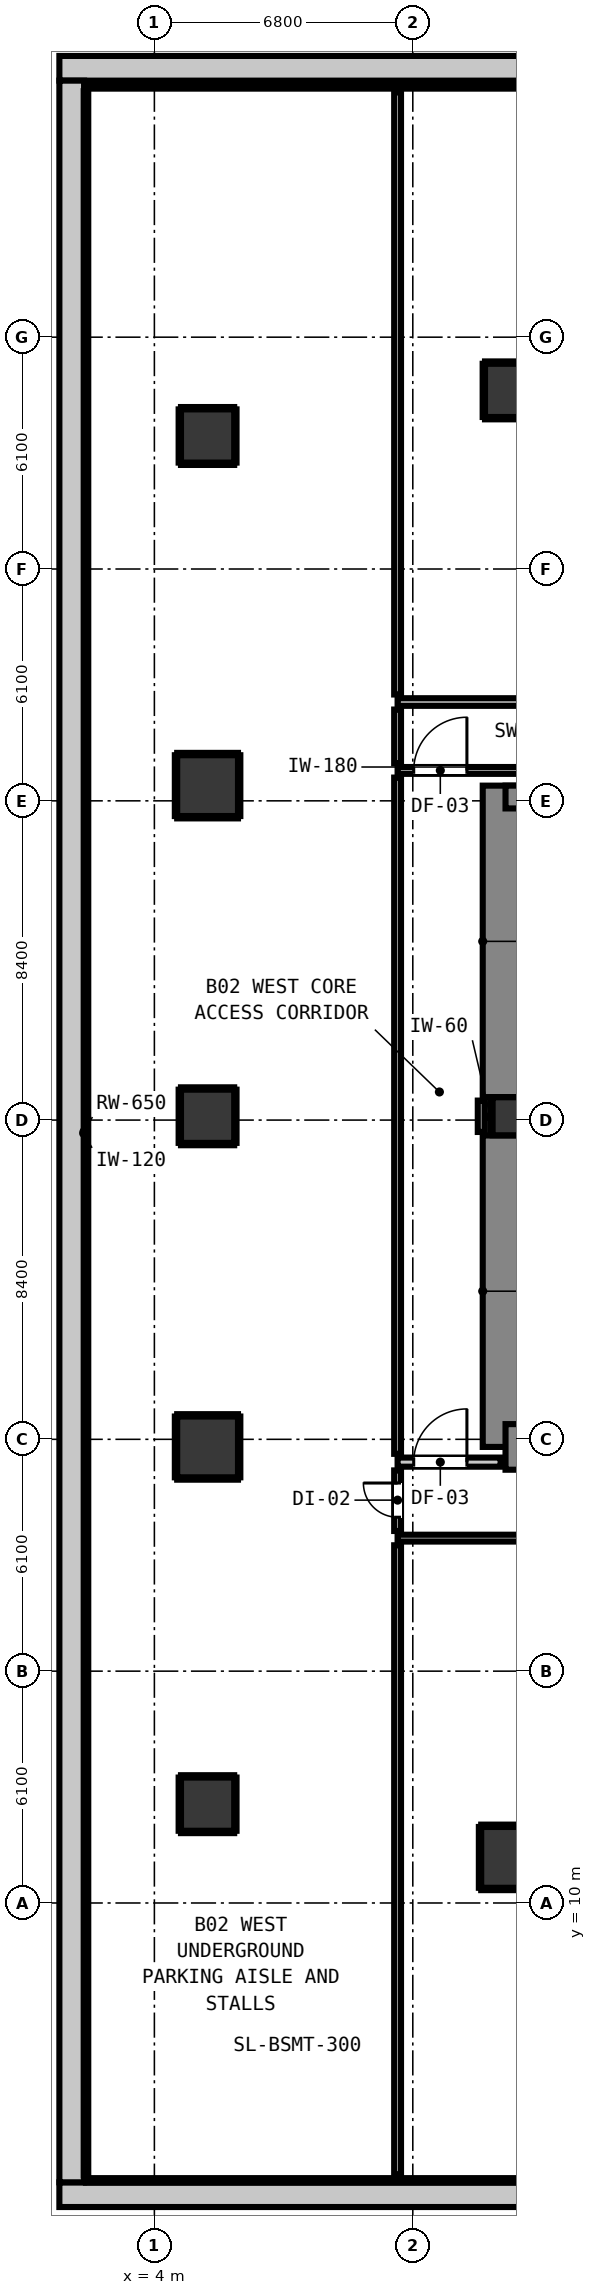
"""IFC4 building model, lengths in metres.
Left out: names, types, materials, properties, quantities, classifications, styles, units other than length and angle.
Written with IfcOpenShell. Run it as: python <this file> out.ifc"""

import sys

from ifc_helpers import new_model, si_unit, direction, frame, frame_2d, origin, origin_2d, place, context, subcontext, project, spatial, rectangle, extrude, element, fill, save


model = new_model("IFC4")
c1 = context("Model", 3, precision=1e-05, world=origin(), true_north=direction((0.0, 1.0)))
c2 = subcontext(c1, "Body", "Model", "MODEL_VIEW")
j1 = project(units=[si_unit("LENGTHUNIT", "METRE"), si_unit("PLANEANGLEUNIT", "RADIAN")], contexts=[c1])
p1 = place(None, origin())
s1 = spatial("IfcSite", under=j1, at=p1, CompositionType="ELEMENT")
p2 = place(p1, origin())
s2 = spatial("IfcBuilding", under=s1, at=p2, CompositionType="ELEMENT")
p3 = place(p2, frame((0.0, 0.0, -8.8)))
s3 = spatial("IfcBuildingStorey", under=s2, at=p3, CompositionType="ELEMENT", Elevation=-8.8)
for number, where, z_axis, x_axis in (
    (1, (1.5, 2.325, 0.0), (0.0, 0.0, 1.0), (1.0, 0.0, 0.0)),
    (2, (85.0, 58.275, 0.0), (0.0, 0.0, 1.0), (-1.0, 0.0, 0.0)),
):
    element("IfcWall", number, at=place(p3, frame(where, z_axis=z_axis, x_axis=x_axis)), inside=s3, PredefinedType="SOLIDWALL", context=c2, shape_type="SweptSolid", body=[
        extrude(rectangle(XDim=83.5, YDim=0.65, at=frame_2d((41.75, 0.0))), origin(), (0.0, 0.0, 1.0), 4.4),
    ])
p4 = place(p3, frame((1.825, 57.95, 0.0), z_axis=(0.0, 0.0, 1.0), x_axis=(0.0, -1.0, 0.0)))
e3 = element("IfcWall", 3, at=p4, inside=s3, PredefinedType="SOLIDWALL", context=c2, shape_type="SweptSolid", body=[
    extrude(rectangle(XDim=55.3, YDim=0.65, at=frame_2d((27.65, 0.0))), origin(), (0.0, 0.0, 1.0), 4.4),
])
p5 = place(p3, frame((13.4, 30.7, 0.0), z_axis=(0.0, 0.0, 1.0), x_axis=(1.0, 0.0, 0.0)))
e4 = element("IfcColumn", 4, at=p5, inside=s3, PredefinedType="COLUMN", context=c2, shape_type="SweptSolid", body=[
    extrude(rectangle(XDim=1.0, YDim=1.0, at=origin_2d()), origin(), (0.0, 0.0, 1.0), 4.4),
])
p6 = place(p3, frame((13.24, 22.0, 0.0), z_axis=(0.0, 0.0, 1.0), x_axis=(0.0, 1.0, 0.0)))
e5 = element("IfcWall", 5, at=p6, inside=s3, PredefinedType="SHEAR", context=c2, shape_type="SweptSolid", body=[
    extrude(rectangle(XDim=8.195, YDim=1.2, at=frame_2d((4.098, 0.0))), origin(), (0.0, 0.0, 1.0), 4.4),
])
p7 = place(p3, frame((13.24, 31.205, 0.0), z_axis=(0.0, 0.0, 1.0), x_axis=(0.0, 1.0, 0.0)))
e6 = element("IfcWall", 6, at=p7, inside=s3, PredefinedType="SHEAR", context=c2, shape_type="SweptSolid", body=[
    extrude(rectangle(XDim=8.195, YDim=1.2, at=frame_2d((4.097, 0.0))), origin(), (0.0, 0.0, 1.0), 4.4),
])
p8 = place(p3, frame((13.24, 22.0, 0.0), z_axis=(0.0, 0.0, 1.0), x_axis=(1.0, 0.0, 0.0)))
e7 = element("IfcWall", 7, at=p8, inside=s3, PredefinedType="SHEAR", context=c2, shape_type="SweptSolid", body=[
    extrude(rectangle(XDim=4.08, YDim=1.2, at=frame_2d((2.04, 0.0))), origin(), (0.0, 0.0, 1.0), 4.4),
])
p9 = place(p3, frame((13.24, 39.1, 0.0), z_axis=(0.0, 0.0, 1.0), x_axis=(1.0, 0.0, 0.0)))
e8 = element("IfcWall", 8, at=p9, inside=s3, PredefinedType="SHEAR", context=c2, shape_type="SweptSolid", body=[
    extrude(rectangle(XDim=4.08, YDim=0.6, at=frame_2d((2.04, 0.0))), origin(), (0.0, 0.0, 1.0), 4.4),
])
p10 = place(p3, frame((13.4, 11.2, 0.0), z_axis=(0.0, 0.0, 1.0), x_axis=(1.0, 0.0, 0.0)))
e9 = element("IfcColumn", 9, at=p10, inside=s3, PredefinedType="COLUMN", context=c2, shape_type="SweptSolid", body=[
    extrude(rectangle(XDim=1.6, YDim=1.6, at=origin_2d()), origin(), (0.0, 0.0, 1.0), 4.4),
])
p11 = place(p3, frame((13.4, 49.8, 0.0), z_axis=(0.0, 0.0, 1.0), x_axis=(1.0, 0.0, 0.0)))
e10 = element("IfcColumn", 10, at=p11, inside=s3, PredefinedType="COLUMN", context=c2, shape_type="SweptSolid", body=[
    extrude(rectangle(XDim=1.4, YDim=1.4, at=origin_2d()), origin(), (0.0, 0.0, 1.0), 4.4),
])
p12 = place(p3, frame((5.4, 22.0, 0.0), z_axis=(0.0, 0.0, 1.0), x_axis=(1.0, 0.0, 0.0)))
e11 = element("IfcColumn", 11, at=p12, inside=s3, PredefinedType="COLUMN", context=c2, shape_type="SweptSolid", body=[
    extrude(rectangle(XDim=1.6, YDim=1.6, at=origin_2d()), origin(), (0.0, 0.0, 1.0), 4.4),
])
p13 = place(p3, frame((5.4, 30.7, 0.0), z_axis=(0.0, 0.0, 1.0), x_axis=(1.0, 0.0, 0.0)))
e12 = element("IfcColumn", 12, at=p13, inside=s3, PredefinedType="COLUMN", context=c2, shape_type="SweptSolid", body=[
    extrude(rectangle(XDim=1.4, YDim=1.4, at=origin_2d()), origin(), (0.0, 0.0, 1.0), 4.4),
])
p14 = place(p3, frame((5.4, 39.4, 0.0), z_axis=(0.0, 0.0, 1.0), x_axis=(1.0, 0.0, 0.0)))
e13 = element("IfcColumn", 13, at=p14, inside=s3, PredefinedType="COLUMN", context=c2, shape_type="SweptSolid", body=[
    extrude(rectangle(XDim=1.6, YDim=1.6, at=origin_2d()), origin(), (0.0, 0.0, 1.0), 4.4),
])
for number, where, z_axis, x_axis in (
    (14, (5.4, 12.6, 0.0), (0.0, 0.0, 1.0), (1.0, 0.0, 0.0)),
    (15, (5.4, 48.6, 0.0), (0.0, 0.0, 1.0), (1.0, 0.0, 0.0)),
):
    element("IfcColumn", number, at=place(p3, frame(where, z_axis=z_axis, x_axis=x_axis)), inside=s3, PredefinedType="COLUMN", context=c2, shape_type="SweptSolid", body=[
        extrude(rectangle(XDim=1.4, YDim=1.4, at=origin_2d()), origin(), (0.0, 0.0, 1.0), 4.4),
    ])
p15 = place(p3, frame((10.4, 21.6, 0.0), z_axis=(0.0, 0.0, 1.0), x_axis=(1.0, 0.0, 0.0)))
e16 = element("IfcWall", 16, at=p15, inside=s3, PredefinedType="PARTITIONING", context=c2, shape_type="SweptSolid", body=[
    extrude(rectangle(XDim=2.71, YDim=0.24, at=frame_2d((1.355, 0.0))), origin(), (0.0, 0.0, 1.0), 3.335),
])
p16 = place(p15, frame((0.424, 0.0, 0.0)))
e17 = element("IfcOpeningElement", 17, at=p16, cuts=e16, PredefinedType="OPENING", context=c2, shape_type="SweptSolid", body=[
    extrude(rectangle(XDim=1.4, YDim=2.15, at=frame_2d((0.7, 1.075))), frame((0.0, 0.13, 0.0), z_axis=(0.0, -1.0, 0.0), x_axis=(1.0, 0.0, 0.0)), (0.0, 0.0, 1.0), 0.26),
])
p17 = place(p3, frame((10.4, 41.6, 0.0), z_axis=(0.0, 0.0, 1.0), x_axis=(1.0, 0.0, 0.0)))
e18 = element("IfcWall", 18, at=p17, inside=s3, PredefinedType="PARTITIONING", context=c2, shape_type="SweptSolid", body=[
    extrude(rectangle(XDim=44.788, YDim=0.2, at=frame_2d((22.394, 0.0))), origin(), (0.0, 0.0, 1.0), 4.1),
])
p18 = place(p17, frame((16.374, 0.0, 0.0)))
e19 = element("IfcOpeningElement", 19, at=p18, cuts=e18, PredefinedType="OPENING", context=c2, shape_type="SweptSolid", body=[
    extrude(rectangle(XDim=0.9, YDim=2.1, at=frame_2d((0.45, 1.05))), frame((0.0, 0.11, 0.0), z_axis=(0.0, -1.0, 0.0), x_axis=(1.0, 0.0, 0.0)), (0.0, 0.0, 1.0), 0.22),
])
p19 = place(p17, frame((35.37, 0.0, 0.0)))
e20 = element("IfcOpeningElement", 20, at=p19, cuts=e18, PredefinedType="OPENING", context=c2, shape_type="SweptSolid", body=[
    extrude(rectangle(XDim=0.86, YDim=2.02, at=frame_2d((0.43, 1.01))), frame((0.0, 0.11, 0.0), z_axis=(0.0, -1.0, 0.0), x_axis=(1.0, 0.0, 0.0)), (0.0, 0.0, 1.0), 0.22),
])
p20 = place(p17, frame((39.725, 0.0, 0.0)))
e21 = element("IfcOpeningElement", 21, at=p20, cuts=e18, PredefinedType="OPENING", context=c2, shape_type="SweptSolid", body=[
    extrude(rectangle(XDim=0.95, YDim=2.1, at=frame_2d((0.475, 1.05))), frame((0.0, 0.11, 0.0), z_axis=(0.0, -1.0, 0.0), x_axis=(1.0, 0.0, 0.0)), (0.0, 0.0, 1.0), 0.22),
])
p21 = place(p3, frame((10.4, 19.6, 0.0), z_axis=(0.0, 0.0, 1.0), x_axis=(1.0, 0.0, 0.0)))
e22 = element("IfcWall", 22, at=p21, inside=s3, PredefinedType="PARTITIONING", context=c2, shape_type="SweptSolid", body=[
    extrude(rectangle(XDim=36.902, YDim=0.18, at=frame_2d((18.451, 0.0))), origin(), (0.0, 0.0, 1.0), 4.1),
])
p22 = place(p21, frame((13.274, 0.0, 0.0)))
e23 = element("IfcOpeningElement", 23, at=p22, cuts=e22, PredefinedType="OPENING", context=c2, shape_type="SweptSolid", body=[
    extrude(rectangle(XDim=0.9, YDim=2.1, at=frame_2d((0.45, 1.05))), frame((0.0, 0.1, 0.0), z_axis=(0.0, -1.0, 0.0), x_axis=(1.0, 0.0, 0.0)), (0.0, 0.0, 1.0), 0.2),
])
p23 = place(p21, frame((32.576, 0.0, 0.0)))
e24 = element("IfcOpeningElement", 24, at=p23, cuts=e22, PredefinedType="OPENING", context=c2, shape_type="SweptSolid", body=[
    extrude(rectangle(XDim=0.9, YDim=2.1, at=frame_2d((0.45, 1.05))), frame((0.0, 0.1, 0.0), z_axis=(0.0, -1.0, 0.0), x_axis=(1.0, 0.0, 0.0)), (0.0, 0.0, 1.0), 0.2),
])
p24 = place(p3, frame((10.4, 39.8, 0.0), z_axis=(0.0, 0.0, 1.0), x_axis=(1.0, 0.0, 0.0)))
e25 = element("IfcWall", 25, at=p24, inside=s3, PredefinedType="PARTITIONING", context=c2, shape_type="SweptSolid", body=[
    extrude(rectangle(XDim=9.798, YDim=0.18, at=frame_2d((4.899, 0.0))), origin(), (0.0, 0.0, 1.0), 3.335),
])
p25 = place(p24, frame((7.035, 0.0, 0.0)))
e26 = element("IfcOpeningElement", 26, at=p25, cuts=e25, PredefinedType="OPENING", context=c2, shape_type="SweptSolid", body=[
    extrude(rectangle(XDim=1.4, YDim=2.15, at=frame_2d((0.7, 1.075))), frame((0.0, 0.1, 0.0), z_axis=(0.0, -1.0, 0.0), x_axis=(1.0, 0.0, 0.0)), (0.0, 0.0, 1.0), 0.2),
])
p26 = place(p24, frame((0.424, 0.0, 0.0)))
e27 = element("IfcOpeningElement", 27, at=p26, cuts=e25, PredefinedType="OPENING", context=c2, shape_type="SweptSolid", body=[
    extrude(rectangle(XDim=1.4, YDim=2.15, at=frame_2d((0.7, 1.075))), frame((0.0, 0.1, 0.0), z_axis=(0.0, -1.0, 0.0), x_axis=(1.0, 0.0, 0.0)), (0.0, 0.0, 1.0), 0.2),
])
p27 = place(p3, frame((2.2, 2.7, 0.0), z_axis=(0.0, 0.0, 1.0), x_axis=(1.0, 0.0, 0.0)))
e28 = element("IfcWall", 28, at=p27, inside=s3, PredefinedType="PARTITIONING", context=c2, shape_type="SweptSolid", body=[
    extrude(rectangle(XDim=35.6, YDim=0.12, at=frame_2d((17.8, 0.0))), origin(), (0.0, 0.0, 1.0), 4.1),
])
p28 = place(p3, frame((2.2, 57.8, 0.0), z_axis=(0.0, 0.0, 1.0), x_axis=(1.0, 0.0, 0.0)))
e29 = element("IfcWall", 29, at=p28, inside=s3, PredefinedType="PARTITIONING", context=c2, shape_type="SweptSolid", body=[
    extrude(rectangle(XDim=41.8, YDim=0.12, at=frame_2d((20.9, 0.0))), origin(), (0.0, 0.0, 1.0), 4.1),
])
p29 = place(p3, frame((10.4, 2.858, 0.0), z_axis=(0.0, 0.0, 1.0), x_axis=(0.0, 1.0, 0.0)))
e30 = element("IfcWall", 30, at=p29, inside=s3, PredefinedType="PARTITIONING", context=c2, shape_type="SweptSolid", body=[
    extrude(rectangle(XDim=16.554, YDim=0.18, at=frame_2d((8.277, 0.0))), origin(), (0.0, 0.0, 1.0), 4.1),
])
p30 = place(p3, frame((10.4, 19.788, 0.0), z_axis=(0.0, 0.0, 1.0), x_axis=(0.0, 1.0, 0.0)))
e31 = element("IfcWall", 31, at=p30, inside=s3, PredefinedType="PARTITIONING", context=c2, shape_type="SweptSolid", body=[
    extrude(rectangle(XDim=1.594, YDim=0.18, at=frame_2d((0.797, 0.0))), origin(), (0.0, 0.0, 1.0), 4.1),
])
p31 = place(p30, frame((0.362, 0.0, 0.0)))
e32 = element("IfcOpeningElement", 32, at=p31, cuts=e31, PredefinedType="OPENING", context=c2, shape_type="SweptSolid", body=[
    extrude(rectangle(XDim=0.9, YDim=2.1, at=frame_2d((0.45, 1.05))), frame((0.0, 0.1, 0.0), z_axis=(0.0, -1.0, 0.0), x_axis=(1.0, 0.0, 0.0)), (0.0, 0.0, 1.0), 0.2),
])
p32 = place(p3, frame((10.4, 21.818, 0.0), z_axis=(0.0, 0.0, 1.0), x_axis=(0.0, 1.0, 0.0)))
e33 = element("IfcWall", 33, at=p32, inside=s3, PredefinedType="PARTITIONING", context=c2, shape_type="SweptSolid", body=[
    extrude(rectangle(XDim=17.794, YDim=0.18, at=frame_2d((8.897, 0.0))), origin(), (0.0, 0.0, 1.0), 4.1),
])
p33 = place(p3, frame((10.4, 39.988, 0.0), z_axis=(0.0, 0.0, 1.0), x_axis=(0.0, 1.0, 0.0)))
e34 = element("IfcWall", 34, at=p33, inside=s3, PredefinedType="PARTITIONING", context=c2, shape_type="SweptSolid", body=[
    extrude(rectangle(XDim=1.414, YDim=0.18, at=frame_2d((0.707, 0.0))), origin(), (0.0, 0.0, 1.0), 4.1),
])
p34 = place(p3, frame((10.4, 41.798, 0.0), z_axis=(0.0, 0.0, 1.0), x_axis=(0.0, 1.0, 0.0)))
e35 = element("IfcWall", 35, at=p34, inside=s3, PredefinedType="PARTITIONING", context=c2, shape_type="SweptSolid", body=[
    extrude(rectangle(XDim=15.844, YDim=0.18, at=frame_2d((7.922, 0.0))), origin(), (0.0, 0.0, 1.0), 4.1),
])
p35 = place(p3, frame((12.6, 30.287, 0.0), z_axis=(0.0, 0.0, 1.0), x_axis=(0.0, 1.0, 0.0)))
e36 = element("IfcWall", 36, at=p35, inside=s3, PredefinedType="PARTITIONING", context=c2, shape_type="SweptSolid", body=[
    extrude(rectangle(XDim=0.826, YDim=0.18, at=frame_2d((0.413, 0.0))), origin(), (0.0, 0.0, 1.0), 4.1),
])
p36 = place(p3, frame((2.2, 2.828, 0.0), z_axis=(0.0, 0.0, 1.0), x_axis=(0.0, 1.0, 0.0)))
e37 = element("IfcWall", 37, at=p36, inside=s3, PredefinedType="PARTITIONING", context=c2, shape_type="SweptSolid", body=[
    extrude(rectangle(XDim=54.844, YDim=0.12, at=frame_2d((27.422, 0.0))), origin(), (0.0, 0.0, 1.0), 4.1),
])
p37 = place(p3, frame((12.868, 30.21, 0.0), z_axis=(0.0, 0.0, 1.0), x_axis=(0.0, 1.0, 0.0)))
e38 = element("IfcWall", 38, at=p37, inside=s3, PredefinedType="PARTITIONING", context=c2, shape_type="SweptSolid", body=[
    extrude(rectangle(XDim=0.98, YDim=0.06, at=frame_2d((0.49, 0.0))), origin(), (0.0, 0.0, 1.0), 1.45),
])
for number, where, z_axis, x_axis in (
    (39, (12.6, 10.368, 0.0), (0.0, 0.0, 1.0), (1.0, 0.0, 0.0)),
    (40, (12.6, 12.032, 0.0), (0.0, 0.0, 1.0), (1.0, 0.0, 0.0)),
):
    element("IfcWall", number, at=place(p3, frame(where, z_axis=z_axis, x_axis=x_axis)), inside=s3, PredefinedType="PARTITIONING", context=c2, shape_type="SweptSolid", body=[
        extrude(rectangle(XDim=1.6, YDim=0.06, at=frame_2d((0.8, 0.0))), origin(), (0.0, 0.0, 1.0), 1.45),
    ])
p38 = place(p3, frame((12.568, 10.4, 0.0), z_axis=(0.0, 0.0, 1.0), x_axis=(0.0, 1.0, 0.0)))
e41 = element("IfcWall", 41, at=p38, inside=s3, PredefinedType="PARTITIONING", context=c2, shape_type="SweptSolid", body=[
    extrude(rectangle(XDim=1.6, YDim=0.06, at=frame_2d((0.8, 0.0))), origin(), (0.0, 0.0, 1.0), 1.45),
])
for number, where, z_axis, x_axis in (
    (42, (12.7, 49.068, 0.0), (0.0, 0.0, 1.0), (1.0, 0.0, 0.0)),
    (43, (12.7, 50.532, 0.0), (0.0, 0.0, 1.0), (1.0, 0.0, 0.0)),
):
    element("IfcWall", number, at=place(p3, frame(where, z_axis=z_axis, x_axis=x_axis)), inside=s3, PredefinedType="PARTITIONING", context=c2, shape_type="SweptSolid", body=[
        extrude(rectangle(XDim=1.4, YDim=0.06, at=frame_2d((0.7, 0.0))), origin(), (0.0, 0.0, 1.0), 1.45),
    ])
p39 = place(p3, frame((12.668, 49.1, 0.0), z_axis=(0.0, 0.0, 1.0), x_axis=(0.0, 1.0, 0.0)))
e44 = element("IfcWall", 44, at=p39, inside=s3, PredefinedType="PARTITIONING", context=c2, shape_type="SweptSolid", body=[
    extrude(rectangle(XDim=1.4, YDim=0.06, at=frame_2d((0.7, 0.0))), origin(), (0.0, 0.0, 1.0), 1.45),
])
for number, where, z_axis, x_axis in (
    (45, (4.6, 21.168, 0.0), (0.0, 0.0, 1.0), (1.0, 0.0, 0.0)),
    (46, (4.6, 22.832, 0.0), (0.0, 0.0, 1.0), (1.0, 0.0, 0.0)),
):
    element("IfcWall", number, at=place(p3, frame(where, z_axis=z_axis, x_axis=x_axis)), inside=s3, PredefinedType="PARTITIONING", context=c2, shape_type="SweptSolid", body=[
        extrude(rectangle(XDim=1.6, YDim=0.06, at=frame_2d((0.8, 0.0))), origin(), (0.0, 0.0, 1.0), 1.45),
    ])
for number, where, z_axis, x_axis in (
    (47, (4.568, 21.2, 0.0), (0.0, 0.0, 1.0), (0.0, 1.0, 0.0)),
    (48, (6.232, 21.2, 0.0), (0.0, 0.0, 1.0), (0.0, 1.0, 0.0)),
):
    element("IfcWall", number, at=place(p3, frame(where, z_axis=z_axis, x_axis=x_axis)), inside=s3, PredefinedType="PARTITIONING", context=c2, shape_type="SweptSolid", body=[
        extrude(rectangle(XDim=1.6, YDim=0.06, at=frame_2d((0.8, 0.0))), origin(), (0.0, 0.0, 1.0), 1.45),
    ])
for number, where, z_axis, x_axis in (
    (49, (4.7, 29.968, 0.0), (0.0, 0.0, 1.0), (1.0, 0.0, 0.0)),
    (50, (4.7, 31.432, 0.0), (0.0, 0.0, 1.0), (1.0, 0.0, 0.0)),
):
    element("IfcWall", number, at=place(p3, frame(where, z_axis=z_axis, x_axis=x_axis)), inside=s3, PredefinedType="PARTITIONING", context=c2, shape_type="SweptSolid", body=[
        extrude(rectangle(XDim=1.4, YDim=0.06, at=frame_2d((0.7, 0.0))), origin(), (0.0, 0.0, 1.0), 1.45),
    ])
for number, where, z_axis, x_axis in (
    (51, (4.668, 30.0, 0.0), (0.0, 0.0, 1.0), (0.0, 1.0, 0.0)),
    (52, (6.132, 30.0, 0.0), (0.0, 0.0, 1.0), (0.0, 1.0, 0.0)),
):
    element("IfcWall", number, at=place(p3, frame(where, z_axis=z_axis, x_axis=x_axis)), inside=s3, PredefinedType="PARTITIONING", context=c2, shape_type="SweptSolid", body=[
        extrude(rectangle(XDim=1.4, YDim=0.06, at=frame_2d((0.7, 0.0))), origin(), (0.0, 0.0, 1.0), 1.45),
    ])
for number, where, z_axis, x_axis in (
    (53, (4.6, 38.568, 0.0), (0.0, 0.0, 1.0), (1.0, 0.0, 0.0)),
    (54, (4.6, 40.232, 0.0), (0.0, 0.0, 1.0), (1.0, 0.0, 0.0)),
    (55, (4.568, 38.6, 0.0), (0.0, 0.0, 1.0), (0.0, 1.0, 0.0)),
    (56, (6.232, 38.6, 0.0), (0.0, 0.0, 1.0), (0.0, 1.0, 0.0)),
):
    element("IfcWall", number, at=place(p3, frame(where, z_axis=z_axis, x_axis=x_axis)), inside=s3, PredefinedType="PARTITIONING", context=c2, shape_type="SweptSolid", body=[
        extrude(rectangle(XDim=1.6, YDim=0.06, at=frame_2d((0.8, 0.0))), origin(), (0.0, 0.0, 1.0), 1.45),
    ])
for number, where, z_axis, x_axis in (
    (57, (4.7, 11.868, 0.0), (0.0, 0.0, 1.0), (1.0, 0.0, 0.0)),
    (58, (4.7, 13.332, 0.0), (0.0, 0.0, 1.0), (1.0, 0.0, 0.0)),
    (59, (4.668, 11.9, 0.0), (0.0, 0.0, 1.0), (0.0, 1.0, 0.0)),
    (60, (6.132, 11.9, 0.0), (0.0, 0.0, 1.0), (0.0, 1.0, 0.0)),
    (61, (4.7, 47.868, 0.0), (0.0, 0.0, 1.0), (1.0, 0.0, 0.0)),
    (62, (4.7, 49.332, 0.0), (0.0, 0.0, 1.0), (1.0, 0.0, 0.0)),
    (63, (4.668, 47.9, 0.0), (0.0, 0.0, 1.0), (0.0, 1.0, 0.0)),
    (64, (6.132, 47.9, 0.0), (0.0, 0.0, 1.0), (0.0, 1.0, 0.0)),
):
    element("IfcWall", number, at=place(p3, frame(where, z_axis=z_axis, x_axis=x_axis)), inside=s3, PredefinedType="PARTITIONING", context=c2, shape_type="SweptSolid", body=[
        extrude(rectangle(XDim=1.4, YDim=0.06, at=frame_2d((0.7, 0.0))), origin(), (0.0, 0.0, 1.0), 1.45),
    ])
p40 = place(p16, origin())
e65 = element("IfcDoor", 65, at=p40, inside=s3, OperationType="SINGLE_SWING_RIGHT", PredefinedType="DOOR", context=c2, shape_type="SweptSolid", body=[
    extrude(rectangle(XDim=1.4, YDim=2.15, at=frame_2d((0.7, 1.075))), frame((0.0, 0.025, 0.0), z_axis=(0.0, -1.0, 0.0), x_axis=(1.0, 0.0, 0.0)), (0.0, 0.0, 1.0), 0.05),
])
fill(e17, e65)
p41 = place(p26, origin())
e66 = element("IfcDoor", 66, at=p41, inside=s3, OperationType="SINGLE_SWING_RIGHT", PredefinedType="DOOR", context=c2, shape_type="SweptSolid", body=[
    extrude(rectangle(XDim=1.4, YDim=2.15, at=frame_2d((0.7, 1.075))), frame((0.0, 0.025, 0.0), z_axis=(0.0, -1.0, 0.0), x_axis=(1.0, 0.0, 0.0)), (0.0, 0.0, 1.0), 0.05),
])
fill(e27, e66)
p42 = place(p31, origin())
e67 = element("IfcDoor", 67, at=p42, inside=s3, OperationType="SINGLE_SWING_RIGHT", PredefinedType="DOOR", context=c2, shape_type="SweptSolid", body=[
    extrude(rectangle(XDim=0.9, YDim=2.1, at=frame_2d((0.45, 1.05))), frame((0.0, 0.025, 0.0), z_axis=(0.0, -1.0, 0.0), x_axis=(1.0, 0.0, 0.0)), (0.0, 0.0, 1.0), 0.05),
])
fill(e32, e67)
save(model, sys.argv[1])
